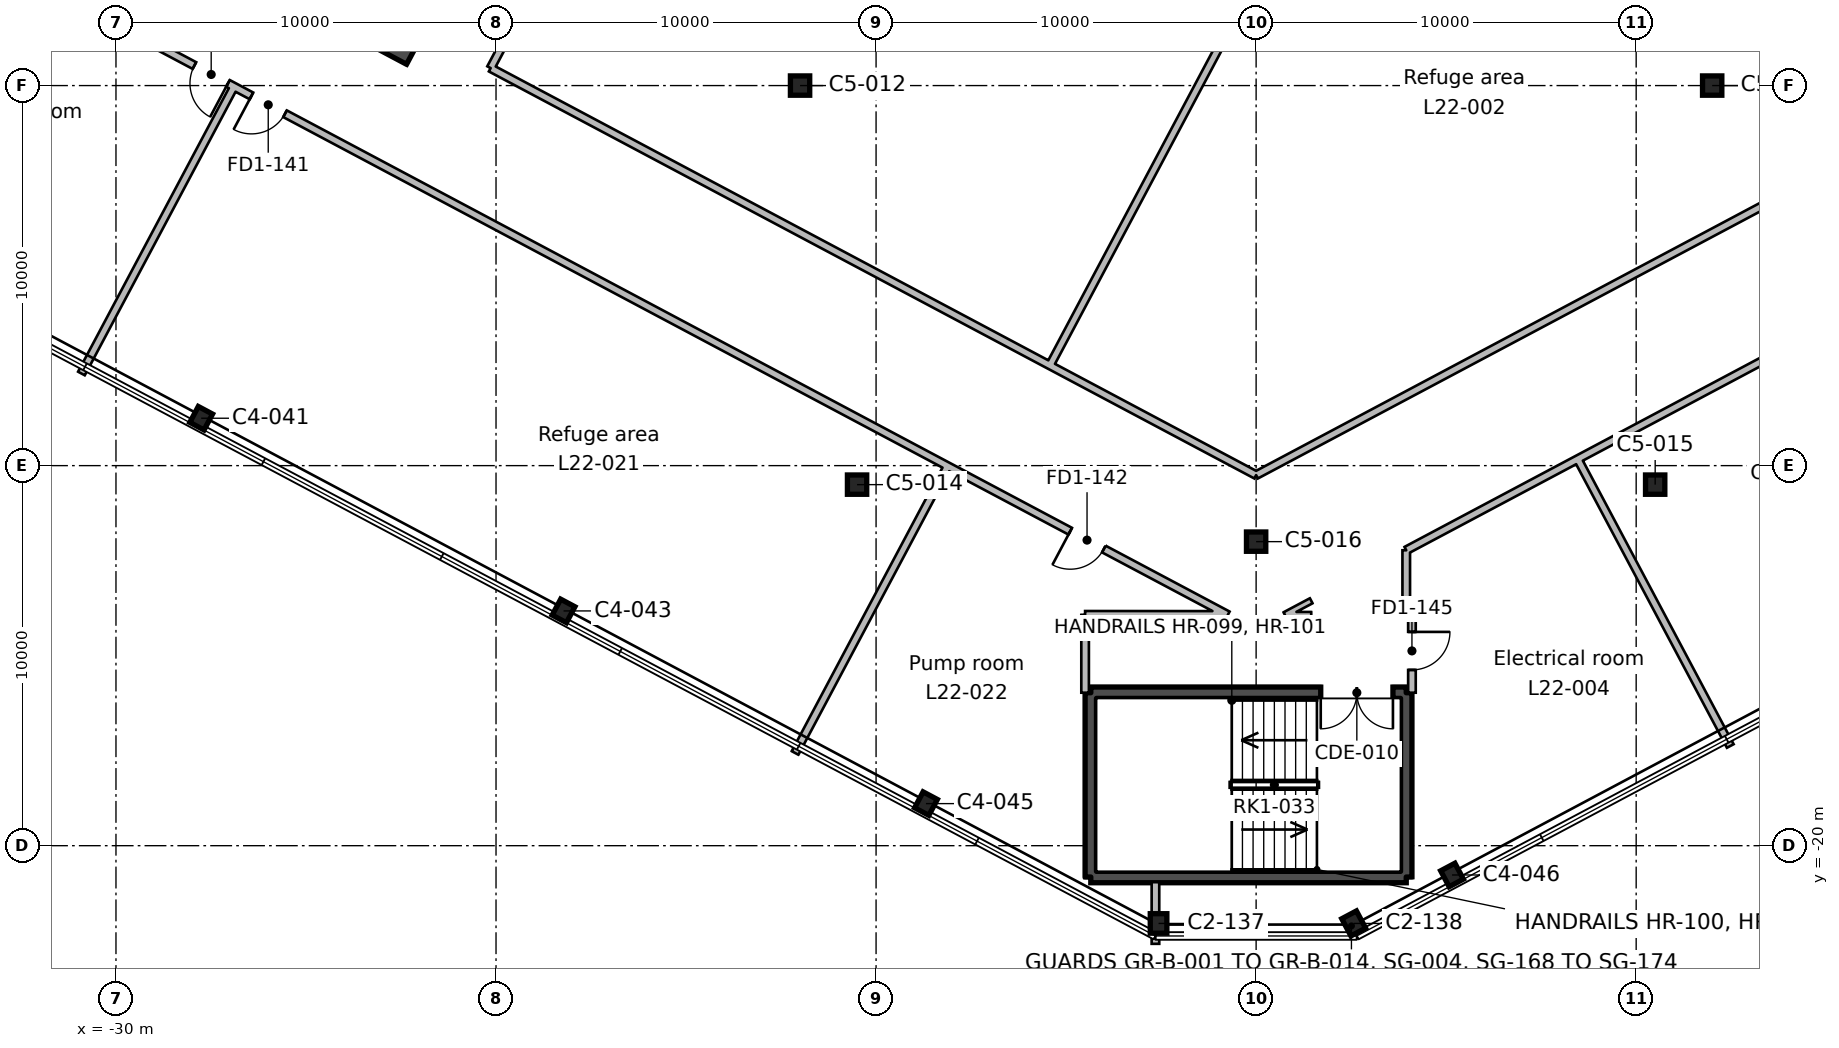
"""IFC4 building model, lengths in metres.
Left out: names, types, materials, properties, quantities, classifications, styles, units other than length and angle.
Written with IfcOpenShell. Run it as: python <this file> out.ifc"""

import sys

from ifc_helpers import new_model, si_unit, direction, frame, frame_2d, origin, origin_2d, place, context, subcontext, project, spatial, rectangle, hollow_rectangle, i_section, extrude, element, fill, save


model = new_model("IFC4")
c1 = context("Model", 3, precision=1e-05, world=origin(), true_north=direction((0.0, 1.0)))
c2 = subcontext(c1, "Body", "Model", "MODEL_VIEW")
j1 = project(units=[si_unit("LENGTHUNIT", "METRE"), si_unit("PLANEANGLEUNIT", "RADIAN")], contexts=[c1])
p1 = place(None, origin())
s1 = spatial("IfcSite", under=j1, at=p1, CompositionType="ELEMENT")
p2 = place(p1, origin())
s2 = spatial("IfcBuilding", under=s1, at=p2, CompositionType="ELEMENT")
p3 = place(p2, frame((0.0, 0.0, 112.2)))
s3 = spatial("IfcBuildingStorey", under=s2, at=p3, CompositionType="ELEMENT", Elevation=112.2)
for number, where, z_axis, x_axis in (
    (1, (-2.567, -22.046, 0.0), (0.0, 0.0, 1.0), (1.0, 0.0, 0.0)),
    (2, (2.567, -22.046, 0.0), (0.0, 0.0, 1.0), (0.883, 0.469, 0.0)),
):
    element("IfcColumn", number, at=place(p3, frame(where, z_axis=z_axis, x_axis=x_axis)), inside=s3, PredefinedType="COLUMN", context=c2, shape_type="SweptSolid", body=[
        extrude(i_section(OverallWidth=0.437, OverallDepth=0.513, WebThickness=0.061, FlangeThickness=0.097, FilletRadius=0.015, at=origin_2d()), origin(), (0.0, 0.0, 1.0), 6.0),
    ])
for number, where, z_axis, x_axis in (
    (3, (5.155, -20.771, 0.0), (0.0, 0.0, 1.0), (0.883, 0.469, 0.0)),
    (4, (-8.687, -18.893, 0.0), (0.0, 0.0, 1.0), (0.883, -0.469, 0.0)),
    (5, (-18.223, -13.823, 0.0), (0.0, 0.0, 1.0), (0.883, -0.469, 0.0)),
):
    element("IfcColumn", number, at=place(p3, frame(where, z_axis=z_axis, x_axis=x_axis)), inside=s3, PredefinedType="COLUMN", context=c2, shape_type="SweptSolid", body=[
        extrude(i_section(OverallWidth=0.424, OverallDepth=0.475, WebThickness=0.048, FlangeThickness=0.077, FilletRadius=0.015, at=origin_2d()), origin(), (0.0, 0.0, 1.0), 6.0),
    ])
for number, where, z_axis, x_axis in (
    (6, (0.0, -12.0, 0.0), (0.0, 0.0, 1.0), (1.0, 0.0, 0.0)),
    (7, (-10.5, -10.5, 0.0), (0.0, 0.0, 1.0), (1.0, 0.0, 0.0)),
    (8, (10.5, -10.5, 0.0), (0.0, 0.0, 1.0), (1.0, 0.0, 0.0)),
):
    element("IfcColumn", number, at=place(p3, frame(where, z_axis=z_axis, x_axis=x_axis)), inside=s3, PredefinedType="COLUMN", context=c2, shape_type="SweptSolid", body=[
        extrude(hollow_rectangle(XDim=0.508, YDim=0.508, WallThickness=0.021, InnerFilletRadius=0.01, OuterFilletRadius=0.031, at=origin_2d()), origin(), (0.0, 0.0, 1.0), 6.0),
    ])
p4 = place(p3, frame((-27.758, -8.753, 0.0), z_axis=(0.0, 0.0, 1.0), x_axis=(0.882947592859, -0.469471562786, 0.0)))
e9 = element("IfcColumn", 9, at=p4, inside=s3, PredefinedType="COLUMN", context=c2, shape_type="SweptSolid", body=[
    extrude(i_section(OverallWidth=0.424, OverallDepth=0.475, WebThickness=0.048, FlangeThickness=0.077, FilletRadius=0.015, at=origin_2d()), origin(), (0.0, 0.0, 1.0), 6.0),
])
for number, where, z_axis, x_axis in (
    (10, (-12.0, 0.0, 0.0), (0.0, 0.0, 1.0), (1.0, 0.0, 0.0)),
    (11, (12.0, 0.0, 0.0), (0.0, 0.0, 1.0), (1.0, 0.0, 0.0)),
):
    element("IfcColumn", number, at=place(p3, frame(where, z_axis=z_axis, x_axis=x_axis)), inside=s3, PredefinedType="COLUMN", context=c2, shape_type="SweptSolid", body=[
        extrude(hollow_rectangle(XDim=0.508, YDim=0.508, WallThickness=0.021, InnerFilletRadius=0.01, OuterFilletRadius=0.031, at=origin_2d()), origin(), (0.0, 0.0, 1.0), 6.0),
    ])
p5 = place(p3, frame((-13.362, 18.43, 0.0), z_axis=(0.0, 0.0, 1.0), x_axis=(-0.46947084998, -0.882947971864, 0.0)))
e12 = element("IfcWall", 12, at=p5, inside=s3, PredefinedType="SHEAR", context=c2, shape_type="SweptSolid", body=[
    extrude(rectangle(XDim=20.0, YDim=0.9, at=frame_2d((10.0, 0.0))), origin(), (0.0, 0.0, 1.0), 6.0),
])
p6 = place(p5, frame((7.0, 0.0, 0.0)))
e13 = element("IfcOpeningElement", 13, at=p6, cuts=e12, PredefinedType="OPENING", context=c2, shape_type="SweptSolid", body=[
    extrude(rectangle(XDim=2.4, YDim=2.4, at=frame_2d((1.2, 1.2))), frame((0.0, 0.46, 0.0), z_axis=(0.0, -1.0, 0.0), x_axis=(1.0, 0.0, 0.0)), (0.0, 0.0, 1.0), 0.92),
])
p7 = place(p3, frame((19.219, -1.107, 0.0), z_axis=(0.0, 0.0, 1.0), x_axis=(-0.46947084998, 0.882947971864, 0.0)))
e14 = element("IfcWall", 14, at=p7, inside=s3, PredefinedType="SHEAR", context=c2, shape_type="SweptSolid", body=[
    extrude(rectangle(XDim=20.0, YDim=0.9, at=frame_2d((10.0, 0.0))), origin(), (0.0, 0.0, 1.0), 6.0),
])
p8 = place(p7, frame((7.0, 0.0, 0.0)))
e15 = element("IfcOpeningElement", 15, at=p8, cuts=e14, PredefinedType="OPENING", context=c2, shape_type="SweptSolid", body=[
    extrude(rectangle(XDim=2.4, YDim=2.4, at=frame_2d((1.2, 1.2))), frame((0.0, 0.46, 0.0), z_axis=(0.0, -1.0, 0.0), x_axis=(1.0, 0.0, 0.0)), (0.0, 0.0, 1.0), 0.92),
])
p9 = place(p3, frame((3.95, -15.975, 0.0), z_axis=(0.0, 0.0, 1.0), x_axis=(0.0, -1.0, 0.0)))
e16 = element("IfcWall", 16, at=p9, inside=s3, PredefinedType="SHEAR", context=c2, shape_type="SweptSolid", body=[
    extrude(rectangle(XDim=4.85, YDim=0.3, at=frame_2d((2.425, 0.0))), origin(), (0.0, 0.0, 1.0), 6.0),
])
p10 = place(p3, frame((3.95, -20.825, 0.0), z_axis=(0.0, 0.0, 1.0), x_axis=(-1.0, 0.0, 0.0)))
e17 = element("IfcWall", 17, at=p10, inside=s3, PredefinedType="SHEAR", context=c2, shape_type="SweptSolid", body=[
    extrude(rectangle(XDim=8.3, YDim=0.3, at=frame_2d((4.15, 0.0))), origin(), (0.0, 0.0, 1.0), 6.0),
])
p11 = place(p3, frame((-4.35, -20.825, 0.0), z_axis=(0.0, 0.0, 1.0), x_axis=(0.0, 1.0, 0.0)))
e18 = element("IfcWall", 18, at=p11, inside=s3, PredefinedType="SHEAR", context=c2, shape_type="SweptSolid", body=[
    extrude(rectangle(XDim=4.85, YDim=0.3, at=frame_2d((2.425, 0.0))), origin(), (0.0, 0.0, 1.0), 6.0),
])
p12 = place(p3, frame((-4.35, -15.975, 0.0), z_axis=(0.0, 0.0, 1.0), x_axis=(1.0, 0.0, 0.0)))
e19 = element("IfcWall", 19, at=p12, inside=s3, PredefinedType="SHEAR", context=c2, shape_type="SweptSolid", body=[
    extrude(rectangle(XDim=8.3, YDim=0.3, at=frame_2d((4.15, 0.0))), origin(), (0.0, 0.0, 1.0), 6.0),
])
p13 = place(p12, frame((6.05, 0.0, 0.0)))
e20 = element("IfcOpeningElement", 20, at=p13, cuts=e19, PredefinedType="OPENING", context=c2, shape_type="SweptSolid", body=[
    extrude(rectangle(XDim=1.9, YDim=2.1, at=frame_2d((0.95, 1.05))), frame((0.0, 0.16, 0.0), z_axis=(0.0, -1.0, 0.0), x_axis=(1.0, 0.0, 0.0)), (0.0, 0.0, 1.0), 0.32),
])
p14 = place(p3, frame((-26.894, -0.027, 0.0), z_axis=(0.0, 0.0, 1.0), x_axis=(-0.469572720633, -0.882893798844, 0.0)))
e21 = element("IfcWall", 21, at=p14, inside=s3, PredefinedType="PARTITIONING", context=c2, shape_type="SweptSolid", body=[
    extrude(rectangle(XDim=8.55, YDim=0.2, at=frame_2d((4.275, 0.0))), origin(), (0.0, 0.0, 1.0), 5.55),
])
p15 = place(p3, frame((-8.114, -10.013, 0.0), z_axis=(0.0, 0.0, 1.0), x_axis=(-0.882945090575, 0.469476268866, 0.0)))
e22 = element("IfcWall", 22, at=p15, inside=s3, PredefinedType="PARTITIONING", context=c2, shape_type="SweptSolid", body=[
    extrude(rectangle(XDim=41.437, YDim=0.2, at=frame_2d((20.719, 0.0))), origin(), (0.0, 0.0, 1.0), 5.55),
])
p16 = place(p15, frame((21.45, 0.0, 0.0)))
e23 = element("IfcOpeningElement", 23, at=p16, cuts=e22, PredefinedType="OPENING", context=c2, shape_type="SweptSolid", body=[
    extrude(rectangle(XDim=1.0, YDim=2.1, at=frame_2d((0.5, 1.05))), frame((0.0, 0.11, 0.0), z_axis=(0.0, -1.0, 0.0), x_axis=(1.0, 0.0, 0.0)), (0.0, 0.0, 1.0), 0.22),
])
p17 = place(p15, frame((19.75, 0.0, 0.0)))
e24 = element("IfcOpeningElement", 24, at=p17, cuts=e22, PredefinedType="OPENING", context=c2, shape_type="SweptSolid", body=[
    extrude(rectangle(XDim=1.0, YDim=2.1, at=frame_2d((0.5, 1.05))), frame((0.0, 0.11, 0.0), z_axis=(0.0, -1.0, 0.0), x_axis=(1.0, 0.0, 0.0)), (0.0, 0.0, 1.0), 0.22),
])
p18 = place(p3, frame((-8.117, -10.011, 0.0), z_axis=(0.0, 0.0, 1.0), x_axis=(-0.469583140133, -0.882888257087, 0.0)))
e25 = element("IfcWall", 25, at=p18, inside=s3, PredefinedType="PARTITIONING", context=c2, shape_type="SweptSolid", body=[
    extrude(rectangle(XDim=8.551, YDim=0.2, at=frame_2d((4.275, 0.0))), origin(), (0.0, 0.0, 1.0), 5.55),
])
p19 = place(p3, frame((-20.142, 0.46, 0.0), z_axis=(0.0, 0.0, 1.0), x_axis=(0.469506937019, 0.882928783136, 0.0)))
e26 = element("IfcWall", 26, at=p19, inside=s3, PredefinedType="PARTITIONING", context=c2, shape_type="SweptSolid", body=[
    extrude(rectangle(XDim=18.1, YDim=0.2, at=frame_2d((9.05, 0.0))), origin(), (0.0, 0.0, 1.0), 5.55),
])
p20 = place(p19, frame((8.55, 0.0, 0.0)))
e27 = element("IfcOpeningElement", 27, at=p20, cuts=e26, PredefinedType="OPENING", context=c2, shape_type="SweptSolid", body=[
    extrude(rectangle(XDim=1.0, YDim=2.1, at=frame_2d((0.5, 1.05))), frame((0.0, 0.11, 0.0), z_axis=(0.0, -1.0, 0.0), x_axis=(1.0, 0.0, 0.0)), (0.0, 0.0, 1.0), 0.22),
])
p21 = place(p3, frame((-5.427, -7.364, 0.0), z_axis=(0.0, 0.0, 1.0), x_axis=(-0.882951980563, 0.469463310622, 0.0)))
e28 = element("IfcWall", 28, at=p21, inside=s3, PredefinedType="PARTITIONING", context=c2, shape_type="SweptSolid", body=[
    extrude(rectangle(XDim=16.666, YDim=0.2, at=frame_2d((8.333, 0.0))), origin(), (0.0, 0.0, 1.0), 5.55),
])
p22 = place(p3, frame((-8.114, -10.013, 0.0), z_axis=(0.0, 0.0, 1.0), x_axis=(0.883132384784, -0.469123854591, 0.0)))
e29 = element("IfcWall", 29, at=p22, inside=s3, PredefinedType="PARTITIONING", context=c2, shape_type="SweptSolid", body=[
    extrude(rectangle(XDim=8.345, YDim=0.2, at=frame_2d((4.173, 0.0))), origin(), (0.0, 0.0, 1.0), 5.55),
])
p23 = place(p22, frame((3.65, 0.0, 0.0)))
e30 = element("IfcOpeningElement", 30, at=p23, cuts=e29, PredefinedType="OPENING", context=c2, shape_type="SweptSolid", body=[
    extrude(rectangle(XDim=1.0, YDim=2.1, at=frame_2d((0.5, 1.05))), frame((0.0, 0.11, 0.0), z_axis=(0.0, -1.0, 0.0), x_axis=(1.0, 0.0, 0.0)), (0.0, 0.0, 1.0), 0.22),
])
p24 = place(p3, frame((-0.744, -13.928, 0.0), z_axis=(0.0, 0.0, 1.0), x_axis=(-0.999999695815, 0.000779980263, 0.0)))
e31 = element("IfcWall", 31, at=p24, inside=s3, PredefinedType="PARTITIONING", context=c2, shape_type="SweptSolid", body=[
    extrude(rectangle(XDim=3.756, YDim=0.2, at=frame_2d((1.878, 0.0))), origin(), (0.0, 0.0, 1.0), 5.55),
])
p25 = place(p3, frame((10.861, -4.475, 0.0), z_axis=(0.0, 0.0, 1.0), x_axis=(-0.882948888511, -0.469469126011, 0.0)))
e32 = element("IfcWall", 32, at=p25, inside=s3, PredefinedType="PARTITIONING", context=c2, shape_type="SweptSolid", body=[
    extrude(rectangle(XDim=12.301, YDim=0.2, at=frame_2d((6.15, 0.0))), origin(), (0.0, 0.0, 1.0), 5.55),
])
p26 = place(p3, frame((0.0, -10.25, 0.0), z_axis=(0.0, 0.0, 1.0), x_axis=(-0.882920737254, 0.469522067348, 0.0)))
e33 = element("IfcWall", 33, at=p26, inside=s3, PredefinedType="PARTITIONING", context=c2, shape_type="SweptSolid", body=[
    extrude(rectangle(XDim=6.147, YDim=0.2, at=frame_2d((3.073, 0.0))), origin(), (0.0, 0.0, 1.0), 5.55),
])
p27 = place(p3, frame((-5.427, -7.364, 0.0), z_axis=(0.0, 0.0, 1.0), x_axis=(0.469484998898, 0.88294044862, 0.0)))
e34 = element("IfcWall", 34, at=p27, inside=s3, PredefinedType="PARTITIONING", context=c2, shape_type="SweptSolid", body=[
    extrude(rectangle(XDim=23.255, YDim=0.2, at=frame_2d((11.627, 0.0))), origin(), (0.0, 0.0, 1.0), 5.55),
])
p28 = place(p3, frame((-4.5, -13.925, 0.0), z_axis=(0.0, 0.0, 1.0), x_axis=(0.0, -1.0, 0.0)))
e35 = element("IfcWall", 35, at=p28, inside=s3, PredefinedType="PARTITIONING", context=c2, shape_type="SweptSolid", body=[
    extrude(rectangle(XDim=2.05, YDim=0.2, at=frame_2d((1.025, 0.0))), origin(), (0.0, 0.0, 1.0), 5.55),
])
p29 = place(p3, frame((-2.649, -20.96, 0.0), z_axis=(0.0, 0.0, 1.0), x_axis=(0.0, -1.0, 0.0)))
e36 = element("IfcWall", 36, at=p29, inside=s3, PredefinedType="PARTITIONING", context=c2, shape_type="SweptSolid", body=[
    extrude(rectangle(XDim=1.622, YDim=0.2, at=frame_2d((0.811, 0.0))), origin(), (0.0, 0.0, 1.0), 5.55),
])
p30 = place(p3, frame((4.1, -13.925, 0.0), z_axis=(0.0, 0.0, 1.0), x_axis=(0.0, -1.0, 0.0)))
e37 = element("IfcWall", 37, at=p30, inside=s3, PredefinedType="PARTITIONING", context=c2, shape_type="SweptSolid", body=[
    extrude(rectangle(XDim=2.05, YDim=0.2, at=frame_2d((1.025, 0.0))), origin(), (0.0, 0.0, 1.0), 5.55),
])
p31 = place(p30, frame((0.45, 0.0, 0.0)))
e38 = element("IfcOpeningElement", 38, at=p31, cuts=e37, PredefinedType="OPENING", context=c2, shape_type="SweptSolid", body=[
    extrude(rectangle(XDim=1.0, YDim=2.1, at=frame_2d((0.5, 1.05))), frame((0.0, 0.11, 0.0), z_axis=(0.0, -1.0, 0.0), x_axis=(1.0, 0.0, 0.0)), (0.0, 0.0, 1.0), 0.22),
])
p32 = place(p3, frame((3.95, -13.925, 0.0), z_axis=(0.0, 0.0, 1.0), x_axis=(0.0, 1.0, 0.0)))
e39 = element("IfcWall", 39, at=p32, inside=s3, PredefinedType="PARTITIONING", context=c2, shape_type="SweptSolid", body=[
    extrude(rectangle(XDim=1.698, YDim=0.2, at=frame_2d((0.849, 0.0))), origin(), (0.0, 0.0, 1.0), 5.55),
])
p33 = place(p3, frame((8.462, -9.828, 0.0), z_axis=(0.0, 0.0, 1.0), x_axis=(0.469494105573, -0.882935606277, 0.0)))
e40 = element("IfcWall", 40, at=p33, inside=s3, PredefinedType="PARTITIONING", context=c2, shape_type="SweptSolid", body=[
    extrude(rectangle(XDim=8.55, YDim=0.2, at=frame_2d((4.275, 0.0))), origin(), (0.0, 0.0, 1.0), 5.55),
])
p34 = place(p3, frame((57.135, 16.052, 0.0), z_axis=(0.0, 0.0, 1.0), x_axis=(-0.882947211229, -0.469472280528, 0.0)))
e41 = element("IfcWall", 41, at=p34, inside=s3, PredefinedType="PARTITIONING", context=c2, shape_type="SweptSolid", body=[
    extrude(rectangle(XDim=60.236, YDim=0.2, at=frame_2d((30.118, 0.0))), origin(), (0.0, 0.0, 1.0), 5.55),
])
p35 = place(p34, frame((38.75, 0.0, 0.0)))
e42 = element("IfcOpeningElement", 42, at=p35, cuts=e41, PredefinedType="OPENING", context=c2, shape_type="SweptSolid", body=[
    extrude(rectangle(XDim=1.0, YDim=2.1, at=frame_2d((0.5, 1.05))), frame((0.0, 0.11, 0.0), z_axis=(0.0, -1.0, 0.0), x_axis=(1.0, 0.0, 0.0)), (0.0, 0.0, 1.0), 0.22),
])
p36 = place(p34, frame((29.65, 0.0, 0.0)))
e43 = element("IfcOpeningElement", 43, at=p36, cuts=e41, PredefinedType="OPENING", context=c2, shape_type="SweptSolid", body=[
    extrude(rectangle(XDim=1.0, YDim=2.1, at=frame_2d((0.5, 1.05))), frame((0.0, 0.11, 0.0), z_axis=(0.0, -1.0, 0.0), x_axis=(1.0, 0.0, 0.0)), (0.0, 0.0, 1.0), 0.22),
])
p37 = place(p34, frame((20.85, 0.0, 0.0)))
e44 = element("IfcOpeningElement", 44, at=p37, cuts=e41, PredefinedType="OPENING", context=c2, shape_type="SweptSolid", body=[
    extrude(rectangle(XDim=1.0, YDim=2.1, at=frame_2d((0.5, 1.05))), frame((0.0, 0.11, 0.0), z_axis=(0.0, -1.0, 0.0), x_axis=(1.0, 0.0, 0.0)), (0.0, 0.0, 1.0), 0.22),
])
p38 = place(p3, frame((8.148, 14.496, 0.0), z_axis=(0.0, 0.0, 1.0), x_axis=(0.469493235768, -0.882936068789, 0.0)))
e45 = element("IfcWall", 45, at=p38, inside=s3, PredefinedType="PARTITIONING", context=c2, shape_type="SweptSolid", body=[
    extrude(rectangle(XDim=18.024, YDim=0.2, at=frame_2d((9.012, 0.0))), origin(), (0.0, 0.0, 1.0), 5.55),
])
p39 = place(p38, frame((8.55, 0.0, 0.0)))
e46 = element("IfcOpeningElement", 46, at=p39, cuts=e45, PredefinedType="OPENING", context=c2, shape_type="SweptSolid", body=[
    extrude(rectangle(XDim=1.0, YDim=2.1, at=frame_2d((0.5, 1.05))), frame((0.0, 0.11, 0.0), z_axis=(0.0, -1.0, 0.0), x_axis=(1.0, 0.0, 0.0)), (0.0, 0.0, 1.0), 0.22),
])
p40 = place(p3, frame((16.61, -1.418, 0.0), z_axis=(0.0, 0.0, 1.0), x_axis=(-0.882927289084, -0.469509746641, 0.0)))
e47 = element("IfcWall", 47, at=p40, inside=s3, PredefinedType="PARTITIONING", context=c2, shape_type="SweptSolid", body=[
    extrude(rectangle(XDim=6.511, YDim=0.2, at=frame_2d((3.256, 0.0))), origin(), (0.0, 0.0, 1.0), 5.55),
])
p41 = place(p3, frame((1.45, -13.556, 0.0), z_axis=(0.0, 0.0, 1.0), x_axis=(-0.882834022315, -0.469685095616, 0.0)))
e48 = element("IfcWall", 48, at=p41, inside=s3, PredefinedType="PARTITIONING", context=c2, shape_type="SweptSolid", body=[
    extrude(rectangle(XDim=0.786, YDim=0.15, at=frame_2d((0.393, 0.0))), origin(), (0.0, 0.0, 1.0), 5.55),
])
p42 = place(p3, frame((0.756, -13.925, 0.0), z_axis=(0.0, 0.0, 1.0), x_axis=(1.0, 0.0, 0.0)))
e49 = element("IfcWall", 49, at=p42, inside=s3, PredefinedType="PARTITIONING", context=c2, shape_type="SweptSolid", body=[
    extrude(rectangle(XDim=0.694, YDim=0.15, at=frame_2d((0.347, 0.0))), origin(), (0.0, 0.0, 1.0), 5.55),
])
p43 = place(p13, frame((1.9, 0.0, 0.0), z_axis=(0.0, 0.0, 1.0), x_axis=(-1.0, 0.0, 0.0)))
e50 = element("IfcDoor", 50, at=p43, inside=s3, OperationType="DOUBLE_DOOR_SINGLE_SWING", PredefinedType="DOOR", context=c2, shape_type="SweptSolid", body=[
    extrude(rectangle(XDim=1.9, YDim=2.1, at=frame_2d((0.95, 1.05))), frame((0.0, 0.025, 0.0), z_axis=(0.0, -1.0, 0.0), x_axis=(1.0, 0.0, 0.0)), (0.0, 0.0, 1.0), 0.05),
])
fill(e20, e50)
p44 = place(p31, origin())
e51 = element("IfcDoor", 51, at=p44, inside=s3, OperationType="SINGLE_SWING_LEFT", PredefinedType="DOOR", context=c2, shape_type="SweptSolid", body=[
    extrude(rectangle(XDim=1.0, YDim=2.1, at=frame_2d((0.5, 1.05))), frame((0.0, 0.025, 0.0), z_axis=(0.0, -1.0, 0.0), x_axis=(1.0, 0.0, 0.0)), (0.0, 0.0, 1.0), 0.05),
])
fill(e38, e51)
p45 = place(p16, origin())
e52 = element("IfcDoor", 52, at=p45, inside=s3, OperationType="SINGLE_SWING_LEFT", PredefinedType="DOOR", context=c2, shape_type="SweptSolid", body=[
    extrude(rectangle(XDim=1.0, YDim=2.1, at=frame_2d((0.5, 1.05))), frame((0.0, 0.025, 0.0), z_axis=(0.0, -1.0, 0.0), x_axis=(1.0, 0.0, 0.0)), (0.0, 0.0, 1.0), 0.05),
])
fill(e23, e52)
p46 = place(p17, origin())
e53 = element("IfcDoor", 53, at=p46, inside=s3, OperationType="SINGLE_SWING_RIGHT", PredefinedType="DOOR", context=c2, shape_type="SweptSolid", body=[
    extrude(rectangle(XDim=1.0, YDim=2.1, at=frame_2d((0.5, 1.05))), frame((0.0, 0.025, 0.0), z_axis=(0.0, -1.0, 0.0), x_axis=(1.0, 0.0, 0.0)), (0.0, 0.0, 1.0), 0.05),
])
fill(e24, e53)
p47 = place(p23, frame((1.0, 0.0, 0.0), z_axis=(0.0, 0.0, 1.0), x_axis=(-1.0, 0.0, 0.0)))
e54 = element("IfcDoor", 54, at=p47, inside=s3, OperationType="SINGLE_SWING_RIGHT", PredefinedType="DOOR", context=c2, shape_type="SweptSolid", body=[
    extrude(rectangle(XDim=1.0, YDim=2.1, at=frame_2d((0.5, 1.05))), frame((0.0, 0.025, 0.0), z_axis=(0.0, -1.0, 0.0), x_axis=(1.0, 0.0, 0.0)), (0.0, 0.0, 1.0), 0.05),
])
fill(e30, e54)
save(model, sys.argv[1])
